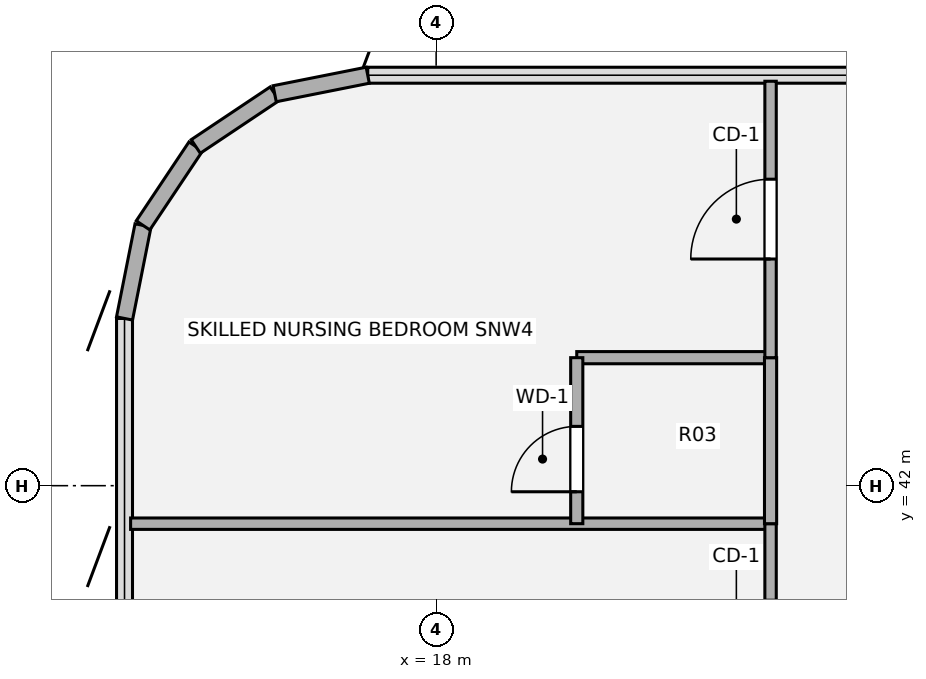
"""IFC4 building model, lengths in metres.
Left out: names, types, materials, properties, quantities, classifications, styles, units other than length and angle.
Written with IfcOpenShell. Run it as: python <this file> out.ifc"""

import sys

from ifc_helpers import new_model, si_unit, direction, frame, frame_2d, origin, origin_2d, place, context, subcontext, project, spatial, rectangle, extrude, source, transform, mapped, element, fill, save


model = new_model("IFC4")
c1 = context("Model", 3, precision=1e-05, world=origin(), true_north=direction((0.0, 1.0)))
c2 = subcontext(c1, "Body", "Model", "MODEL_VIEW")
j1 = project(units=[si_unit("LENGTHUNIT", "METRE"), si_unit("PLANEANGLEUNIT", "RADIAN")], contexts=[c1])
p1 = place(None, origin())
s1 = spatial("IfcSite", under=j1, at=p1, CompositionType="ELEMENT")
p2 = place(p1, origin())
s2 = spatial("IfcBuilding", under=s1, at=p2, CompositionType="ELEMENT")
p3 = place(p2, frame((0.0, 0.0, 131.4)))
s3 = spatial("IfcBuildingStorey", under=s2, at=p3, CompositionType="ELEMENT", Elevation=131.4)
for number, where, z_axis, x_axis in (
    (1, (13.9, 44.2, 0.0), (0.0, 0.0, 1.0), (0.195, 0.981, 0.0)),
    (2, (14.144, 45.425, 0.0), (0.0, 0.0, 1.0), (0.556, 0.831, 0.0)),
    (3, (14.837, 46.463, 0.0), (0.0, 0.0, 1.0), (0.831, 0.556, 0.0)),
    (4, (15.875, 47.156, 0.0), (0.0, 0.0, 1.0), (0.981, 0.195, 0.0)),
):
    element("IfcWall", number, at=place(p3, frame(where, z_axis=z_axis, x_axis=x_axis)), inside=s3, PredefinedType="SOLIDWALL", context=c2, shape_type="SweptSolid", body=[
        extrude(rectangle(XDim=1.249, YDim=0.215, at=frame_2d((0.624, 0.0))), origin(), (0.0, 0.0, 1.0), 3.53),
    ])
p4 = place(p3, frame((13.98, 41.5, 0.0), z_axis=(0.0, 0.0, 1.0), x_axis=(1.0, 0.0, 0.0)))
e5 = element("IfcWall", 5, at=p4, inside=s3, PredefinedType="PARTITIONING", context=c2, shape_type="SweptSolid", body=[
    extrude(rectangle(XDim=8.42, YDim=0.15, at=frame_2d((4.21, 0.0))), origin(), (0.0, 0.0, 1.0), 3.5),
])
p5 = place(p3, frame((19.85, 43.684, 0.0), z_axis=(0.0, 0.0, 1.0), x_axis=(1.0, 0.0, 0.0)))
e6 = element("IfcWall", 6, at=p5, inside=s3, PredefinedType="PLUMBINGWALL", context=c2, shape_type="SweptSolid", body=[
    extrude(rectangle(XDim=2.55, YDim=0.16, at=frame_2d((1.275, 0.0))), origin(), (0.0, 0.0, 1.0), 3.5),
])
p6 = place(p3, frame((19.85, 41.5, 0.0), z_axis=(0.0, 0.0, 1.0), x_axis=(0.0, 1.0, 0.0)))
e7 = element("IfcWall", 7, at=p6, inside=s3, PredefinedType="PLUMBINGWALL", context=c2, shape_type="SweptSolid", body=[
    extrude(rectangle(XDim=2.184, YDim=0.16, at=frame_2d((1.092, 0.0))), origin(), (0.0, 0.0, 1.0), 3.5),
])
p7 = place(p6, frame((0.42, 0.0, 0.0)))
e8 = element("IfcOpeningElement", 8, at=p7, cuts=e7, PredefinedType="OPENING", context=c2, shape_type="SweptSolid", body=[
    extrude(rectangle(XDim=0.86, YDim=2.1, at=origin_2d()), frame((0.43, 0.09, 1.05), z_axis=(0.0, -1.0, 0.0), x_axis=(1.0, 0.0, 0.0)), (0.0, 0.0, 1.0), 0.18),
])
p8 = place(p3, frame((22.4, 38.426, 0.0), z_axis=(0.0, 0.0, 1.0), x_axis=(0.0, 1.0, 0.0)))
e9 = element("IfcWall", 9, at=p8, inside=s3, PredefinedType="PARTITIONING", context=c2, shape_type="SweptSolid", body=[
    extrude(rectangle(XDim=3.074, YDim=0.15, at=frame_2d((1.537, 0.0))), origin(), (0.0, 0.0, 1.0), 3.5),
])
p9 = place(p8, frame((1.017, 0.0, 0.0)))
e10 = element("IfcOpeningElement", 10, at=p9, cuts=e9, PredefinedType="OPENING", context=c2, shape_type="SweptSolid", body=[
    extrude(rectangle(XDim=1.05, YDim=2.1, at=origin_2d()), frame((0.525, 0.085, 1.05), z_axis=(0.0, -1.0, 0.0), x_axis=(1.0, 0.0, 0.0)), (0.0, 0.0, 1.0), 0.17),
])
p10 = place(p3, frame((22.4, 41.5, 0.0), z_axis=(0.0, 0.0, 1.0), x_axis=(0.0, 1.0, 0.0)))
e11 = element("IfcWall", 11, at=p10, inside=s3, PredefinedType="PLUMBINGWALL", context=c2, shape_type="SweptSolid", body=[
    extrude(rectangle(XDim=2.184, YDim=0.16, at=frame_2d((1.092, 0.0))), origin(), (0.0, 0.0, 1.0), 3.5),
])
p11 = place(p3, frame((22.4, 43.684, 0.0), z_axis=(0.0, 0.0, 1.0), x_axis=(0.0, 1.0, 0.0)))
e12 = element("IfcWall", 12, at=p11, inside=s3, PredefinedType="PARTITIONING", context=c2, shape_type="SweptSolid", body=[
    extrude(rectangle(XDim=3.637, YDim=0.15, at=frame_2d((1.818, 0.0))), origin(), (0.0, 0.0, 1.0), 3.5),
])
p12 = place(p11, frame((1.298, 0.0, 0.0)))
e13 = element("IfcOpeningElement", 13, at=p12, cuts=e12, PredefinedType="OPENING", context=c2, shape_type="SweptSolid", body=[
    extrude(rectangle(XDim=1.05, YDim=2.1, at=origin_2d()), frame((0.525, 0.085, 1.05), z_axis=(0.0, -1.0, 0.0), x_axis=(1.0, 0.0, 0.0)), (0.0, 0.0, 1.0), 0.17),
])
m1 = source(origin(), c2, "Body", "SweptSolid", [
    extrude(rectangle(XDim=0.86, YDim=2.1, at=origin_2d()), frame((0.43, 0.025, 1.05), z_axis=(0.0, -1.0, 0.0), x_axis=(1.0, 0.0, 0.0)), (0.0, 0.0, 1.0), 0.05),
])
p13 = place(p7, origin())
e14 = element("IfcDoor", 14, at=p13, inside=s3, OperationType="SINGLE_SWING_LEFT", PredefinedType="DOOR", context=c2, shape_type="MappedRepresentation", body=[
    mapped(m1, transform((0.0, 0.0, 0.0), x_axis=(1.0, 0.0, 0.0), y_axis=(0.0, 1.0, 0.0), z_axis=(0.0, 0.0, 1.0), scale=1.0)),
])
fill(e8, e14)
m2 = source(origin(), c2, "Body", "SweptSolid", [
    extrude(rectangle(XDim=1.05, YDim=2.1, at=origin_2d()), frame((0.525, 0.025, 1.05), z_axis=(0.0, -1.0, 0.0), x_axis=(1.0, 0.0, 0.0)), (0.0, 0.0, 1.0), 0.05),
])
p14 = place(p12, origin())
e15 = element("IfcDoor", 15, at=p14, inside=s3, OperationType="SINGLE_SWING_LEFT", PredefinedType="DOOR", context=c2, shape_type="MappedRepresentation", body=[
    mapped(m2, transform((0.0, 0.0, 0.0), x_axis=(1.0, 0.0, 0.0), y_axis=(0.0, 1.0, 0.0), z_axis=(0.0, 0.0, 1.0), scale=1.0)),
])
fill(e13, e15)
save(model, sys.argv[1])
